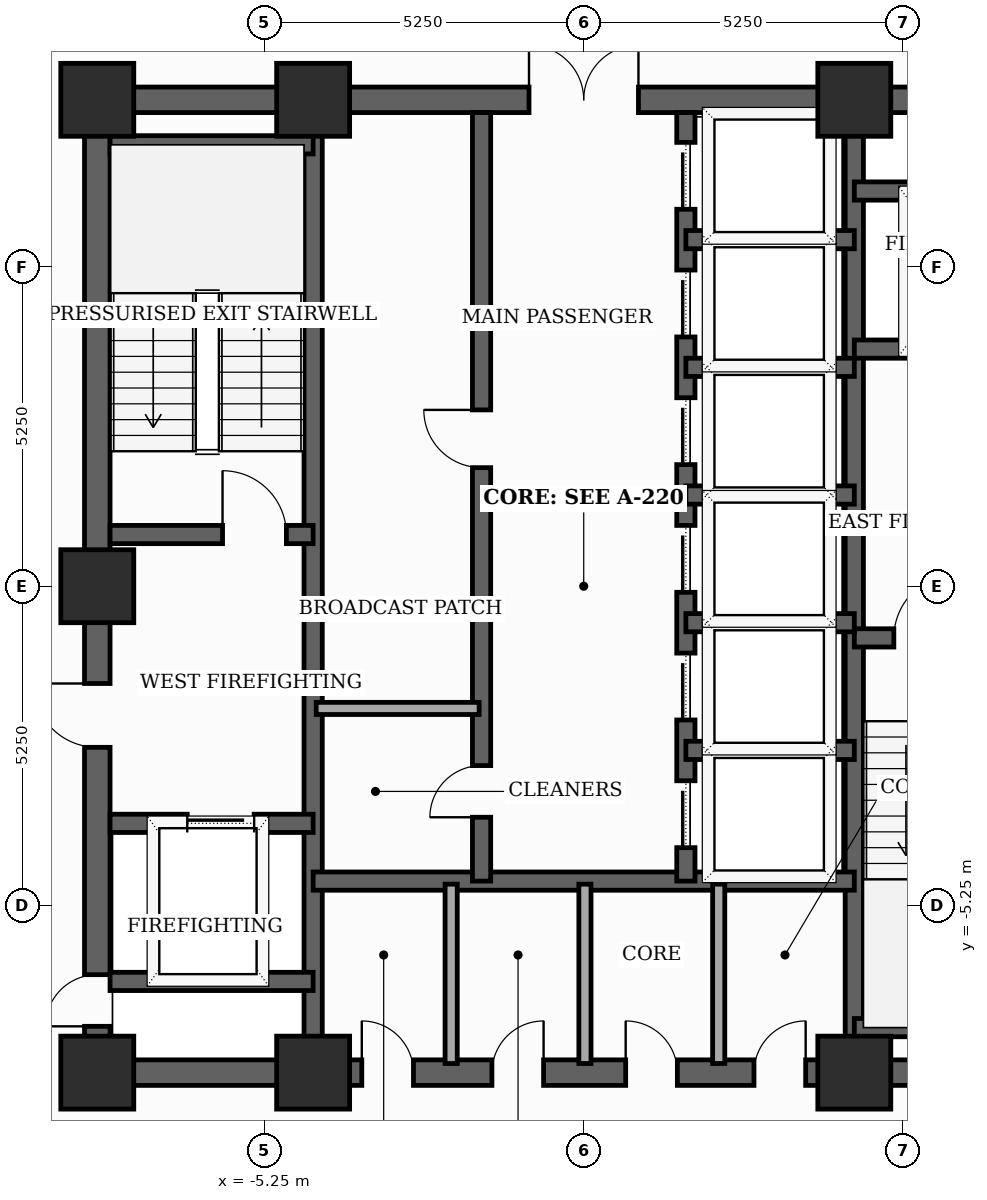
"""IFC4 building model, lengths in metres.
Left out: names, types, materials, properties, quantities, classifications, styles, units other than length and angle.
Written with IfcOpenShell. Run it as: python <this file> out.ifc"""

import sys

from ifc_helpers import new_model, si_unit, direction, frame, frame_2d, origin, origin_2d, place, context, subcontext, project, spatial, rectangle, extrude, element, fill, save


model = new_model("IFC4")
c1 = context("Model", 3, precision=1e-05, world=origin(), true_north=direction((0.0, 1.0)))
c2 = subcontext(c1, "Body", "Model", "MODEL_VIEW")
j1 = project(units=[si_unit("LENGTHUNIT", "METRE"), si_unit("PLANEANGLEUNIT", "RADIAN")], contexts=[c1])
p1 = place(None, origin())
s1 = spatial("IfcSite", under=j1, at=p1, CompositionType="ELEMENT")
p2 = place(p1, origin())
s2 = spatial("IfcBuilding", under=s1, at=p2, CompositionType="ELEMENT")
p3 = place(p2, frame((0.0, 0.0, 210.1)))
s3 = spatial("IfcBuildingStorey", under=s2, at=p3, CompositionType="ELEMENT", Elevation=210.1)
for number, where, z_axis, x_axis in (
    (1, (-8.0, -8.0, 0.0), (0.0, 0.0, 1.0), (1.0, 0.0, 0.0)),
    (2, (-4.45, -8.0, 0.0), (0.0, 0.0, 1.0), (1.0, 0.0, 0.0)),
    (3, (4.45, -8.0, 0.0), (0.0, 0.0, 1.0), (1.0, 0.0, 0.0)),
    (4, (4.45, 8.0, 0.0), (0.0, 0.0, 1.0), (1.0, 0.0, 0.0)),
    (5, (-4.45, 8.0, 0.0), (0.0, 0.0, 1.0), (1.0, 0.0, 0.0)),
    (6, (-8.0, 8.0, 0.0), (0.0, 0.0, 1.0), (1.0, 0.0, 0.0)),
    (7, (-8.0, 0.0, 0.0), (0.0, 0.0, 1.0), (1.0, 0.0, 0.0)),
):
    element("IfcColumn", number, at=place(p3, frame(where, z_axis=z_axis, x_axis=x_axis)), inside=s3, PredefinedType="COLUMN", context=c2, shape_type="SweptSolid", body=[
        extrude(rectangle(XDim=1.2, YDim=1.2, at=origin_2d()), origin(), (0.0, 0.0, 1.0), 3.7),
    ])
p4 = place(p3, frame((-8.0, -8.0, 0.0), z_axis=(0.0, 0.0, 1.0), x_axis=(0.0, 1.0, 0.0)))
e8 = element("IfcWall", 8, at=p4, inside=s3, PredefinedType="SHEAR", context=c2, shape_type="SweptSolid", body=[
    extrude(rectangle(XDim=16.0, YDim=0.42, at=frame_2d((8.0, 0.0))), origin(), (0.0, 0.0, 1.0), 3.46),
])
p5 = place(p4, frame((0.761, 0.0, 0.0)))
e9 = element("IfcOpeningElement", 9, at=p5, cuts=e8, PredefinedType="OPENING", context=c2, shape_type="SweptSolid", body=[
    extrude(rectangle(XDim=0.85, YDim=2.02, at=frame_2d((0.425, 1.01))), frame((0.0, 0.22, 0.0), z_axis=(0.0, -1.0, 0.0), x_axis=(1.0, 0.0, 0.0)), (0.0, 0.0, 1.0), 0.44),
])
p6 = place(p4, frame((5.35, 0.0, 0.0)))
e10 = element("IfcOpeningElement", 10, at=p6, cuts=e8, PredefinedType="OPENING", context=c2, shape_type="SweptSolid", body=[
    extrude(rectangle(XDim=1.05, YDim=2.15, at=frame_2d((0.525, 1.075))), frame((0.0, 0.22, 0.0), z_axis=(0.0, -1.0, 0.0), x_axis=(1.0, 0.0, 0.0)), (0.0, 0.0, 1.0), 0.44),
])
p7 = place(p3, frame((-8.0, -8.0, 0.0), z_axis=(0.0, 0.0, 1.0), x_axis=(1.0, 0.0, 0.0)))
e11 = element("IfcWall", 11, at=p7, inside=s3, PredefinedType="SHEAR", context=c2, shape_type="SweptSolid", body=[
    extrude(rectangle(XDim=16.0, YDim=0.42, at=frame_2d((8.0, 0.0))), origin(), (0.0, 0.0, 1.0), 3.46),
])
p8 = place(p7, frame((4.35, 0.0, 0.0)))
e12 = element("IfcOpeningElement", 12, at=p8, cuts=e11, PredefinedType="OPENING", context=c2, shape_type="SweptSolid", body=[
    extrude(rectangle(XDim=0.85, YDim=2.02, at=frame_2d((0.425, 1.01))), frame((0.0, 0.22, 0.0), z_axis=(0.0, -1.0, 0.0), x_axis=(1.0, 0.0, 0.0)), (0.0, 0.0, 1.0), 0.44),
])
p9 = place(p7, frame((6.49, 0.0, 0.0)))
e13 = element("IfcOpeningElement", 13, at=p9, cuts=e11, PredefinedType="OPENING", context=c2, shape_type="SweptSolid", body=[
    extrude(rectangle(XDim=0.85, YDim=2.02, at=frame_2d((0.425, 1.01))), frame((0.0, 0.22, 0.0), z_axis=(0.0, -1.0, 0.0), x_axis=(1.0, 0.0, 0.0)), (0.0, 0.0, 1.0), 0.44),
])
p10 = place(p7, frame((8.69, 0.0, 0.0)))
e14 = element("IfcOpeningElement", 14, at=p10, cuts=e11, PredefinedType="OPENING", context=c2, shape_type="SweptSolid", body=[
    extrude(rectangle(XDim=0.85, YDim=2.02, at=frame_2d((0.425, 1.01))), frame((0.0, 0.22, 0.0), z_axis=(0.0, -1.0, 0.0), x_axis=(1.0, 0.0, 0.0)), (0.0, 0.0, 1.0), 0.44),
])
p11 = place(p7, frame((10.8, 0.0, 0.0)))
e15 = element("IfcOpeningElement", 15, at=p11, cuts=e11, PredefinedType="OPENING", context=c2, shape_type="SweptSolid", body=[
    extrude(rectangle(XDim=0.85, YDim=2.02, at=frame_2d((0.425, 1.01))), frame((0.0, 0.22, 0.0), z_axis=(0.0, -1.0, 0.0), x_axis=(1.0, 0.0, 0.0)), (0.0, 0.0, 1.0), 0.44),
])
p12 = place(p3, frame((-8.0, 8.0, 0.0), z_axis=(0.0, 0.0, 1.0), x_axis=(1.0, 0.0, 0.0)))
e16 = element("IfcWall", 16, at=p12, inside=s3, PredefinedType="SHEAR", context=c2, shape_type="SweptSolid", body=[
    extrude(rectangle(XDim=16.0, YDim=0.42, at=frame_2d((8.0, 0.0))), origin(), (0.0, 0.0, 1.0), 3.46),
])
p13 = place(p12, frame((7.1, 0.0, 0.0)))
e17 = element("IfcOpeningElement", 17, at=p13, cuts=e16, PredefinedType="OPENING", context=c2, shape_type="SweptSolid", body=[
    extrude(rectangle(XDim=1.8, YDim=2.15, at=frame_2d((0.9, 1.075))), frame((0.0, 0.22, 0.0), z_axis=(0.0, -1.0, 0.0), x_axis=(1.0, 0.0, 0.0)), (0.0, 0.0, 1.0), 0.44),
])
for number, where, z_axis, x_axis in (
    (18, (-4.45, -7.79, 0.0), (0.0, 0.0, 1.0), (0.0, 1.0, 0.0)),
    (19, (4.45, -7.79, 0.0), (0.0, 0.0, 1.0), (0.0, 1.0, 0.0)),
):
    element("IfcWall", number, at=place(p3, frame(where, z_axis=z_axis, x_axis=x_axis)), inside=s3, PredefinedType="SHEAR", context=c2, shape_type="SweptSolid", body=[
        extrude(rectangle(XDim=15.58, YDim=0.3, at=frame_2d((7.79, 0.0))), origin(), (0.0, 0.0, 1.0), 3.46),
    ])
p14 = place(p3, frame((-7.79, 0.85, 0.0), z_axis=(0.0, 0.0, 1.0), x_axis=(1.0, 0.0, 0.0)))
e20 = element("IfcWall", 20, at=p14, inside=s3, PredefinedType="SHEAR", context=c2, shape_type="SweptSolid", body=[
    extrude(rectangle(XDim=3.34, YDim=0.3, at=frame_2d((1.67, 0.0))), origin(), (0.0, 0.0, 1.0), 3.46),
])
p15 = place(p14, frame((1.85, 0.0, 0.0)))
e21 = element("IfcOpeningElement", 21, at=p15, cuts=e20, PredefinedType="OPENING", context=c2, shape_type="SweptSolid", body=[
    extrude(rectangle(XDim=1.05, YDim=2.15, at=frame_2d((0.525, 1.075))), frame((0.0, 0.16, 0.0), z_axis=(0.0, -1.0, 0.0), x_axis=(1.0, 0.0, 0.0)), (0.0, 0.0, 1.0), 0.32),
])
p16 = place(p3, frame((-7.79, 7.26, 0.0), z_axis=(0.0, 0.0, 1.0), x_axis=(1.0, 0.0, 0.0)))
e22 = element("IfcWall", 22, at=p16, inside=s3, PredefinedType="SHEAR", context=c2, shape_type="SweptSolid", body=[
    extrude(rectangle(XDim=3.34, YDim=0.3, at=frame_2d((1.67, 0.0))), origin(), (0.0, 0.0, 1.0), 3.46),
])
p17 = place(p3, frame((4.45, -0.85, 0.0), z_axis=(0.0, 0.0, 1.0), x_axis=(1.0, 0.0, 0.0)))
e23 = element("IfcWall", 23, at=p17, inside=s3, PredefinedType="SHEAR", context=c2, shape_type="SweptSolid", body=[
    extrude(rectangle(XDim=3.34, YDim=0.3, at=frame_2d((1.67, 0.0))), origin(), (0.0, 0.0, 1.0), 3.46),
])
p18 = place(p17, frame((0.65, 0.0, 0.0)))
e24 = element("IfcOpeningElement", 24, at=p18, cuts=e23, PredefinedType="OPENING", context=c2, shape_type="SweptSolid", body=[
    extrude(rectangle(XDim=1.05, YDim=2.15, at=frame_2d((0.525, 1.075))), frame((0.0, 0.16, 0.0), z_axis=(0.0, -1.0, 0.0), x_axis=(1.0, 0.0, 0.0)), (0.0, 0.0, 1.0), 0.32),
])
p19 = place(p3, frame((4.45, -7.26, 0.0), z_axis=(0.0, 0.0, 1.0), x_axis=(1.0, 0.0, 0.0)))
e25 = element("IfcWall", 25, at=p19, inside=s3, PredefinedType="SHEAR", context=c2, shape_type="SweptSolid", body=[
    extrude(rectangle(XDim=3.55, YDim=0.3, at=frame_2d((1.775, 0.0))), origin(), (0.0, 0.0, 1.0), 3.46),
])
p20 = place(p3, frame((-7.79, -3.9, 0.0), z_axis=(0.0, 0.0, 1.0), x_axis=(1.0, 0.0, 0.0)))
e26 = element("IfcWall", 26, at=p20, inside=s3, PredefinedType="SHEAR", context=c2, shape_type="SweptSolid", body=[
    extrude(rectangle(XDim=3.34, YDim=0.3, at=frame_2d((1.67, 0.0))), origin(), (0.0, 0.0, 1.0), 3.46),
])
p21 = place(p20, frame((1.27, 0.0, 0.0)))
e27 = element("IfcOpeningElement", 27, at=p21, cuts=e26, PredefinedType="OPENING", context=c2, shape_type="SweptSolid", body=[
    extrude(rectangle(XDim=1.1, YDim=2.1, at=frame_2d((0.55, 1.05))), frame((0.0, 0.16, 0.0), z_axis=(0.0, -1.0, 0.0), x_axis=(1.0, 0.0, 0.0)), (0.0, 0.0, 1.0), 0.32),
])
p22 = place(p3, frame((-7.79, -6.5, 0.0), z_axis=(0.0, 0.0, 1.0), x_axis=(1.0, 0.0, 0.0)))
e28 = element("IfcWall", 28, at=p22, inside=s3, PredefinedType="SHEAR", context=c2, shape_type="SweptSolid", body=[
    extrude(rectangle(XDim=3.34, YDim=0.3, at=frame_2d((1.67, 0.0))), origin(), (0.0, 0.0, 1.0), 3.46),
])
p23 = place(p3, frame((4.45, 3.9, 0.0), z_axis=(0.0, 0.0, 1.0), x_axis=(1.0, 0.0, 0.0)))
e29 = element("IfcWall", 29, at=p23, inside=s3, PredefinedType="SHEAR", context=c2, shape_type="SweptSolid", body=[
    extrude(rectangle(XDim=3.34, YDim=0.3, at=frame_2d((1.67, 0.0))), origin(), (0.0, 0.0, 1.0), 3.46),
])
p24 = place(p23, frame((1.18, 0.0, 0.0)))
e30 = element("IfcOpeningElement", 30, at=p24, cuts=e29, PredefinedType="OPENING", context=c2, shape_type="SweptSolid", body=[
    extrude(rectangle(XDim=1.1, YDim=2.1, at=frame_2d((0.55, 1.05))), frame((0.0, 0.16, 0.0), z_axis=(0.0, -1.0, 0.0), x_axis=(1.0, 0.0, 0.0)), (0.0, 0.0, 1.0), 0.32),
])
p25 = place(p3, frame((4.45, 6.5, 0.0), z_axis=(0.0, 0.0, 1.0), x_axis=(1.0, 0.0, 0.0)))
e31 = element("IfcWall", 31, at=p25, inside=s3, PredefinedType="SHEAR", context=c2, shape_type="SweptSolid", body=[
    extrude(rectangle(XDim=3.34, YDim=0.3, at=frame_2d((1.67, 0.0))), origin(), (0.0, 0.0, 1.0), 3.46),
])
p26 = place(p3, frame((-4.45, -4.85, 0.0), z_axis=(0.0, 0.0, 1.0), x_axis=(1.0, 0.0, 0.0)))
e32 = element("IfcWall", 32, at=p26, inside=s3, PredefinedType="SHEAR", context=c2, shape_type="SweptSolid", body=[
    extrude(rectangle(XDim=8.9, YDim=0.3, at=frame_2d((4.45, 0.0))), origin(), (0.0, 0.0, 1.0), 3.46),
])
p27 = place(p3, frame((-1.68, -4.85, 0.0), z_axis=(0.0, 0.0, 1.0), x_axis=(0.0, 1.0, 0.0)))
e33 = element("IfcWall", 33, at=p27, inside=s3, PredefinedType="SHEAR", context=c2, shape_type="SweptSolid", body=[
    extrude(rectangle(XDim=12.64, YDim=0.3, at=frame_2d((6.32, 0.0))), origin(), (0.0, 0.0, 1.0), 3.46),
])
p28 = place(p27, frame((1.05, 0.0, 0.0)))
e34 = element("IfcOpeningElement", 34, at=p28, cuts=e33, PredefinedType="OPENING", context=c2, shape_type="SweptSolid", body=[
    extrude(rectangle(XDim=0.85, YDim=2.02, at=frame_2d((0.425, 1.01))), frame((0.0, 0.16, 0.0), z_axis=(0.0, -1.0, 0.0), x_axis=(1.0, 0.0, 0.0)), (0.0, 0.0, 1.0), 0.32),
])
p29 = place(p27, frame((6.8, 0.0, 0.0)))
e35 = element("IfcOpeningElement", 35, at=p29, cuts=e33, PredefinedType="OPENING", context=c2, shape_type="SweptSolid", body=[
    extrude(rectangle(XDim=0.95, YDim=2.1, at=frame_2d((0.475, 1.05))), frame((0.0, 0.16, 0.0), z_axis=(0.0, -1.0, 0.0), x_axis=(1.0, 0.0, 0.0)), (0.0, 0.0, 1.0), 0.32),
])
p30 = place(p3, frame((1.68, -4.85, 0.0), z_axis=(0.0, 0.0, 1.0), x_axis=(0.0, 1.0, 0.0)))
e36 = element("IfcWall", 36, at=p30, inside=s3, PredefinedType="SHEAR", context=c2, shape_type="SweptSolid", body=[
    extrude(rectangle(XDim=12.64, YDim=0.3, at=frame_2d((6.32, 0.0))), origin(), (0.0, 0.0, 1.0), 3.46),
])
p31 = place(p30, frame((0.55, 0.0, 0.0)))
e37 = element("IfcOpeningElement", 37, at=p31, cuts=e36, PredefinedType="OPENING", context=c2, shape_type="SweptSolid", body=[
    extrude(rectangle(XDim=1.1, YDim=2.1, at=frame_2d((0.55, 1.05))), frame((0.0, 0.16, 0.0), z_axis=(0.0, -1.0, 0.0), x_axis=(1.0, 0.0, 0.0)), (0.0, 0.0, 1.0), 0.32),
])
p32 = place(p30, frame((2.65, 0.0, 0.0)))
e38 = element("IfcOpeningElement", 38, at=p32, cuts=e36, PredefinedType="OPENING", context=c2, shape_type="SweptSolid", body=[
    extrude(rectangle(XDim=1.1, YDim=2.1, at=frame_2d((0.55, 1.05))), frame((0.0, 0.16, 0.0), z_axis=(0.0, -1.0, 0.0), x_axis=(1.0, 0.0, 0.0)), (0.0, 0.0, 1.0), 0.32),
])
p33 = place(p30, frame((4.75, 0.0, 0.0)))
e39 = element("IfcOpeningElement", 39, at=p33, cuts=e36, PredefinedType="OPENING", context=c2, shape_type="SweptSolid", body=[
    extrude(rectangle(XDim=1.1, YDim=2.1, at=frame_2d((0.55, 1.05))), frame((0.0, 0.16, 0.0), z_axis=(0.0, -1.0, 0.0), x_axis=(1.0, 0.0, 0.0)), (0.0, 0.0, 1.0), 0.32),
])
p34 = place(p30, frame((6.85, 0.0, 0.0)))
e40 = element("IfcOpeningElement", 40, at=p34, cuts=e36, PredefinedType="OPENING", context=c2, shape_type="SweptSolid", body=[
    extrude(rectangle(XDim=1.1, YDim=2.1, at=frame_2d((0.55, 1.05))), frame((0.0, 0.16, 0.0), z_axis=(0.0, -1.0, 0.0), x_axis=(1.0, 0.0, 0.0)), (0.0, 0.0, 1.0), 0.32),
])
p35 = place(p30, frame((8.95, 0.0, 0.0)))
e41 = element("IfcOpeningElement", 41, at=p35, cuts=e36, PredefinedType="OPENING", context=c2, shape_type="SweptSolid", body=[
    extrude(rectangle(XDim=1.1, YDim=2.1, at=frame_2d((0.55, 1.05))), frame((0.0, 0.16, 0.0), z_axis=(0.0, -1.0, 0.0), x_axis=(1.0, 0.0, 0.0)), (0.0, 0.0, 1.0), 0.32),
])
p36 = place(p30, frame((11.05, 0.0, 0.0)))
e42 = element("IfcOpeningElement", 42, at=p36, cuts=e36, PredefinedType="OPENING", context=c2, shape_type="SweptSolid", body=[
    extrude(rectangle(XDim=1.1, YDim=2.1, at=frame_2d((0.55, 1.05))), frame((0.0, 0.16, 0.0), z_axis=(0.0, -1.0, 0.0), x_axis=(1.0, 0.0, 0.0)), (0.0, 0.0, 1.0), 0.32),
])
for number, where, z_axis, x_axis in (
    (43, (1.68, 1.5, 0.0), (0.0, 0.0, 1.0), (1.0, 0.0, 0.0)),
    (44, (1.68, 3.6, 0.0), (0.0, 0.0, 1.0), (1.0, 0.0, 0.0)),
    (45, (1.68, 5.7, 0.0), (0.0, 0.0, 1.0), (1.0, 0.0, 0.0)),
    (46, (1.68, -2.7, 0.0), (0.0, 0.0, 1.0), (1.0, 0.0, 0.0)),
    (47, (1.68, -0.6, 0.0), (0.0, 0.0, 1.0), (1.0, 0.0, 0.0)),
):
    element("IfcWall", number, at=place(p3, frame(where, z_axis=z_axis, x_axis=x_axis)), inside=s3, PredefinedType="SHEAR", context=c2, shape_type="SweptSolid", body=[
        extrude(rectangle(XDim=2.77, YDim=0.3, at=frame_2d((1.385, 0.0))), origin(), (0.0, 0.0, 1.0), 3.46),
    ])
for number, where, z_axis, x_axis in (
    (48, (-2.18, -7.85, 0.0), (0.0, 0.0, 1.0), (0.0, 1.0, 0.0)),
    (49, (0.02, -7.85, 0.0), (0.0, 0.0, 1.0), (0.0, 1.0, 0.0)),
    (50, (2.22, -7.85, 0.0), (0.0, 0.0, 1.0), (0.0, 1.0, 0.0)),
):
    element("IfcWall", number, at=place(p3, frame(where, z_axis=z_axis, x_axis=x_axis)), inside=s3, PredefinedType="SOLIDWALL", context=c2, shape_type="SweptSolid", body=[
        extrude(rectangle(XDim=2.95, YDim=0.2, at=frame_2d((1.475, 0.0))), origin(), (0.0, 0.0, 1.0), 2.845),
    ])
p37 = place(p3, frame((-4.4, -2.01, 0.0), z_axis=(0.0, 0.0, 1.0), x_axis=(1.0, 0.0, 0.0)))
e51 = element("IfcWall", 51, at=p37, inside=s3, PredefinedType="SOLIDWALL", context=c2, shape_type="SweptSolid", body=[
    extrude(rectangle(XDim=2.68, YDim=0.2, at=frame_2d((1.34, 0.0))), origin(), (0.0, 0.0, 1.0), 3.46),
])
p38 = place(p5, origin())
e52 = element("IfcDoor", 52, at=p38, inside=s3, OperationType="SINGLE_SWING_LEFT", PredefinedType="TRAPDOOR", context=c2, shape_type="SweptSolid", body=[
    extrude(rectangle(XDim=0.85, YDim=2.02, at=frame_2d((0.425, 1.01))), frame((0.0, 0.025, 0.0), z_axis=(0.0, -1.0, 0.0), x_axis=(1.0, 0.0, 0.0)), (0.0, 0.0, 1.0), 0.05),
])
fill(e9, e52)
p39 = place(p6, origin())
e53 = element("IfcDoor", 53, at=p39, inside=s3, OperationType="SINGLE_SWING_RIGHT", PredefinedType="DOOR", context=c2, shape_type="SweptSolid", body=[
    extrude(rectangle(XDim=1.05, YDim=2.15, at=frame_2d((0.525, 1.075))), frame((0.0, 0.025, 0.0), z_axis=(0.0, -1.0, 0.0), x_axis=(1.0, 0.0, 0.0)), (0.0, 0.0, 1.0), 0.05),
])
fill(e10, e53)
p40 = place(p8, origin())
e54 = element("IfcDoor", 54, at=p40, inside=s3, OperationType="SINGLE_SWING_LEFT", PredefinedType="TRAPDOOR", context=c2, shape_type="SweptSolid", body=[
    extrude(rectangle(XDim=0.85, YDim=2.02, at=frame_2d((0.425, 1.01))), frame((0.0, 0.025, 0.0), z_axis=(0.0, -1.0, 0.0), x_axis=(1.0, 0.0, 0.0)), (0.0, 0.0, 1.0), 0.05),
])
fill(e12, e54)
p41 = place(p9, origin())
e55 = element("IfcDoor", 55, at=p41, inside=s3, OperationType="SINGLE_SWING_RIGHT", PredefinedType="TRAPDOOR", context=c2, shape_type="SweptSolid", body=[
    extrude(rectangle(XDim=0.85, YDim=2.02, at=frame_2d((0.425, 1.01))), frame((0.0, 0.025, 0.0), z_axis=(0.0, -1.0, 0.0), x_axis=(1.0, 0.0, 0.0)), (0.0, 0.0, 1.0), 0.05),
])
fill(e13, e55)
p42 = place(p10, origin())
e56 = element("IfcDoor", 56, at=p42, inside=s3, OperationType="SINGLE_SWING_LEFT", PredefinedType="TRAPDOOR", context=c2, shape_type="SweptSolid", body=[
    extrude(rectangle(XDim=0.85, YDim=2.02, at=frame_2d((0.425, 1.01))), frame((0.0, 0.025, 0.0), z_axis=(0.0, -1.0, 0.0), x_axis=(1.0, 0.0, 0.0)), (0.0, 0.0, 1.0), 0.05),
])
fill(e14, e56)
p43 = place(p11, origin())
e57 = element("IfcDoor", 57, at=p43, inside=s3, OperationType="SINGLE_SWING_RIGHT", PredefinedType="TRAPDOOR", context=c2, shape_type="SweptSolid", body=[
    extrude(rectangle(XDim=0.85, YDim=2.02, at=frame_2d((0.425, 1.01))), frame((0.0, 0.025, 0.0), z_axis=(0.0, -1.0, 0.0), x_axis=(1.0, 0.0, 0.0)), (0.0, 0.0, 1.0), 0.05),
])
fill(e15, e57)
p44 = place(p13, origin())
e58 = element("IfcDoor", 58, at=p44, inside=s3, OperationType="DOUBLE_DOOR_SINGLE_SWING", PredefinedType="DOOR", context=c2, shape_type="SweptSolid", body=[
    extrude(rectangle(XDim=1.8, YDim=2.15, at=frame_2d((0.9, 1.075))), frame((0.0, 0.025, 0.0), z_axis=(0.0, -1.0, 0.0), x_axis=(1.0, 0.0, 0.0)), (0.0, 0.0, 1.0), 0.05),
])
fill(e17, e58)
p45 = place(p15, origin())
e59 = element("IfcDoor", 59, at=p45, inside=s3, OperationType="SINGLE_SWING_LEFT", PredefinedType="DOOR", context=c2, shape_type="SweptSolid", body=[
    extrude(rectangle(XDim=1.05, YDim=2.15, at=frame_2d((0.525, 1.075))), frame((0.0, 0.025, 0.0), z_axis=(0.0, -1.0, 0.0), x_axis=(1.0, 0.0, 0.0)), (0.0, 0.0, 1.0), 0.05),
])
fill(e21, e59)
p46 = place(p18, origin())
e60 = element("IfcDoor", 60, at=p46, inside=s3, OperationType="SINGLE_SWING_RIGHT", PredefinedType="DOOR", context=c2, shape_type="SweptSolid", body=[
    extrude(rectangle(XDim=1.05, YDim=2.15, at=frame_2d((0.525, 1.075))), frame((0.0, 0.025, 0.0), z_axis=(0.0, -1.0, 0.0), x_axis=(1.0, 0.0, 0.0)), (0.0, 0.0, 1.0), 0.05),
])
fill(e24, e60)
p47 = place(p21, origin())
e61 = element("IfcDoor", 61, at=p47, inside=s3, OperationType="SLIDING_TO_LEFT", PredefinedType="DOOR", context=c2, shape_type="SweptSolid", body=[
    extrude(rectangle(XDim=1.1, YDim=2.1, at=frame_2d((0.55, 1.05))), frame((0.0, 0.025, 0.0), z_axis=(0.0, -1.0, 0.0), x_axis=(1.0, 0.0, 0.0)), (0.0, 0.0, 1.0), 0.05),
])
fill(e27, e61)
p48 = place(p28, origin())
e62 = element("IfcDoor", 62, at=p48, inside=s3, OperationType="SINGLE_SWING_LEFT", PredefinedType="TRAPDOOR", context=c2, shape_type="SweptSolid", body=[
    extrude(rectangle(XDim=0.85, YDim=2.02, at=frame_2d((0.425, 1.01))), frame((0.0, 0.025, 0.0), z_axis=(0.0, -1.0, 0.0), x_axis=(1.0, 0.0, 0.0)), (0.0, 0.0, 1.0), 0.05),
])
fill(e34, e62)
p49 = place(p29, origin())
e63 = element("IfcDoor", 63, at=p49, inside=s3, OperationType="SINGLE_SWING_RIGHT", PredefinedType="DOOR", context=c2, shape_type="SweptSolid", body=[
    extrude(rectangle(XDim=0.95, YDim=2.1, at=frame_2d((0.475, 1.05))), frame((0.0, 0.025, 0.0), z_axis=(0.0, -1.0, 0.0), x_axis=(1.0, 0.0, 0.0)), (0.0, 0.0, 1.0), 0.05),
])
fill(e35, e63)
p50 = place(p31, origin())
e64 = element("IfcDoor", 64, at=p50, inside=s3, OperationType="SLIDING_TO_LEFT", PredefinedType="DOOR", context=c2, shape_type="SweptSolid", body=[
    extrude(rectangle(XDim=1.1, YDim=2.1, at=frame_2d((0.55, 1.05))), frame((0.0, 0.025, 0.0), z_axis=(0.0, -1.0, 0.0), x_axis=(1.0, 0.0, 0.0)), (0.0, 0.0, 1.0), 0.05),
])
fill(e37, e64)
p51 = place(p32, origin())
e65 = element("IfcDoor", 65, at=p51, inside=s3, OperationType="SLIDING_TO_LEFT", PredefinedType="DOOR", context=c2, shape_type="SweptSolid", body=[
    extrude(rectangle(XDim=1.1, YDim=2.1, at=frame_2d((0.55, 1.05))), frame((0.0, 0.025, 0.0), z_axis=(0.0, -1.0, 0.0), x_axis=(1.0, 0.0, 0.0)), (0.0, 0.0, 1.0), 0.05),
])
fill(e38, e65)
p52 = place(p33, origin())
e66 = element("IfcDoor", 66, at=p52, inside=s3, OperationType="SLIDING_TO_LEFT", PredefinedType="DOOR", context=c2, shape_type="SweptSolid", body=[
    extrude(rectangle(XDim=1.1, YDim=2.1, at=frame_2d((0.55, 1.05))), frame((0.0, 0.025, 0.0), z_axis=(0.0, -1.0, 0.0), x_axis=(1.0, 0.0, 0.0)), (0.0, 0.0, 1.0), 0.05),
])
fill(e39, e66)
p53 = place(p34, origin())
e67 = element("IfcDoor", 67, at=p53, inside=s3, OperationType="SLIDING_TO_LEFT", PredefinedType="DOOR", context=c2, shape_type="SweptSolid", body=[
    extrude(rectangle(XDim=1.1, YDim=2.1, at=frame_2d((0.55, 1.05))), frame((0.0, 0.025, 0.0), z_axis=(0.0, -1.0, 0.0), x_axis=(1.0, 0.0, 0.0)), (0.0, 0.0, 1.0), 0.05),
])
fill(e40, e67)
p54 = place(p35, origin())
e68 = element("IfcDoor", 68, at=p54, inside=s3, OperationType="SLIDING_TO_LEFT", PredefinedType="DOOR", context=c2, shape_type="SweptSolid", body=[
    extrude(rectangle(XDim=1.1, YDim=2.1, at=frame_2d((0.55, 1.05))), frame((0.0, 0.025, 0.0), z_axis=(0.0, -1.0, 0.0), x_axis=(1.0, 0.0, 0.0)), (0.0, 0.0, 1.0), 0.05),
])
fill(e41, e68)
p55 = place(p36, origin())
e69 = element("IfcDoor", 69, at=p55, inside=s3, OperationType="SLIDING_TO_LEFT", PredefinedType="DOOR", context=c2, shape_type="SweptSolid", body=[
    extrude(rectangle(XDim=1.1, YDim=2.1, at=frame_2d((0.55, 1.05))), frame((0.0, 0.025, 0.0), z_axis=(0.0, -1.0, 0.0), x_axis=(1.0, 0.0, 0.0)), (0.0, 0.0, 1.0), 0.05),
])
fill(e42, e69)
save(model, sys.argv[1])
